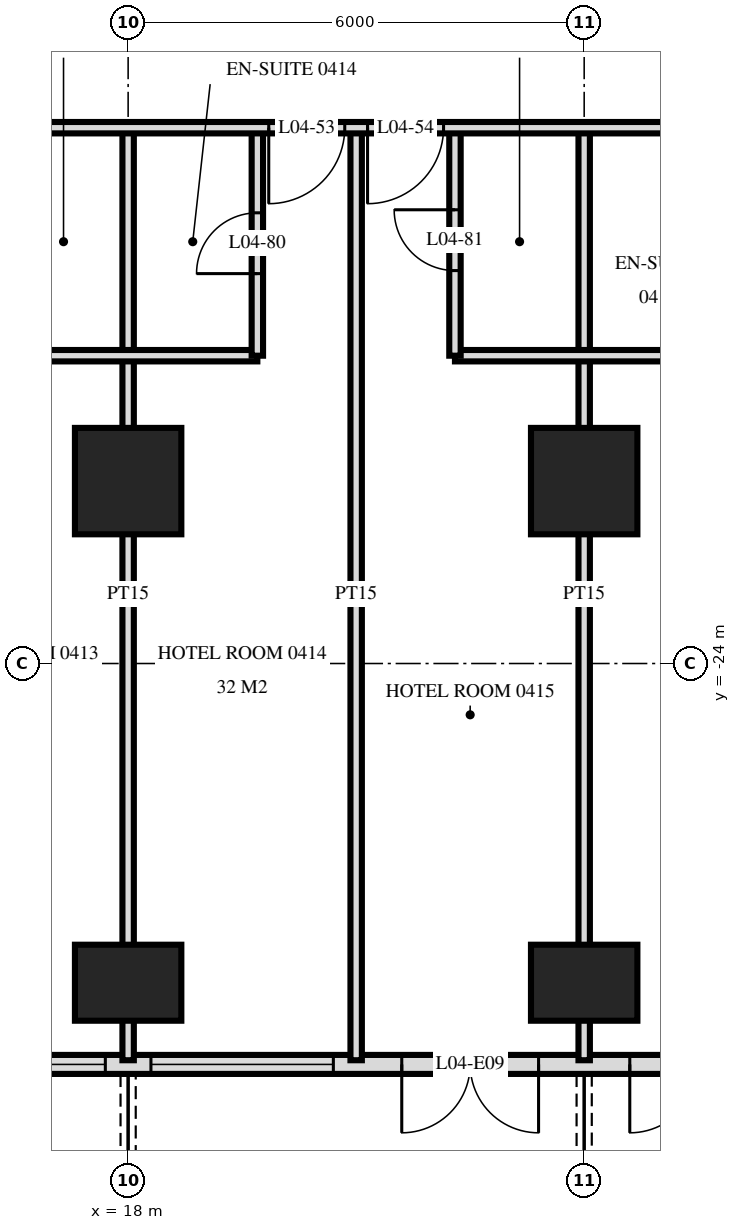
"""IFC4 building model, lengths in metres.
Left out: names, types, materials, properties, quantities, classifications, styles, units other than length and angle.
Written with IfcOpenShell. Run it as: python <this file> out.ifc"""

import sys

from ifc_helpers import new_model, si_unit, direction, frame, frame_2d, origin, origin_2d, place, context, subcontext, project, spatial, rectangle, extrude, element, fill, save


model = new_model("IFC4")
c1 = context("Model", 3, precision=1e-05, world=origin(), true_north=direction((0.0, 1.0)))
c2 = subcontext(c1, "Body", "Model", "MODEL_VIEW")
j1 = project(units=[si_unit("LENGTHUNIT", "METRE"), si_unit("PLANEANGLEUNIT", "RADIAN")], contexts=[c1])
p1 = place(None, origin())
s1 = spatial("IfcSite", under=j1, at=p1, CompositionType="ELEMENT")
p2 = place(p1, origin())
s2 = spatial("IfcBuilding", under=s1, at=p2, CompositionType="ELEMENT")
p3 = place(p2, frame((0.0, 0.0, 24.0)))
s3 = spatial("IfcBuildingStorey", under=s2, at=p3, CompositionType="ELEMENT", Elevation=24.0)
p4 = place(p3, frame((18.0, -28.2, -0.28), z_axis=(0.0, 0.0, 1.0), x_axis=(1.0, 0.0, 0.0)))
e1 = element("IfcColumn", 1, at=p4, inside=s3, PredefinedType="COLUMN", context=c2, shape_type="SweptSolid", body=[
    extrude(rectangle(XDim=1.4, YDim=1.0, at=origin_2d()), origin(), (0.0, 0.0, 1.0), 3.88),
])
p5 = place(p3, frame((18.0, -21.6, -0.28), z_axis=(0.0, 0.0, 1.0), x_axis=(1.0, 0.0, 0.0)))
e2 = element("IfcColumn", 2, at=p5, inside=s3, PredefinedType="COLUMN", context=c2, shape_type="SweptSolid", body=[
    extrude(rectangle(XDim=1.4, YDim=1.4, at=origin_2d()), origin(), (0.0, 0.0, 1.0), 3.88),
])
p6 = place(p3, frame((24.0, -28.2, -0.28), z_axis=(0.0, 0.0, 1.0), x_axis=(1.0, 0.0, 0.0)))
e3 = element("IfcColumn", 3, at=p6, inside=s3, PredefinedType="COLUMN", context=c2, shape_type="SweptSolid", body=[
    extrude(rectangle(XDim=1.4, YDim=1.0, at=origin_2d()), origin(), (0.0, 0.0, 1.0), 3.88),
])
p7 = place(p3, frame((24.0, -21.6, -0.28), z_axis=(0.0, 0.0, 1.0), x_axis=(1.0, 0.0, 0.0)))
e4 = element("IfcColumn", 4, at=p7, inside=s3, PredefinedType="COLUMN", context=c2, shape_type="SweptSolid", body=[
    extrude(rectangle(XDim=1.4, YDim=1.4, at=origin_2d()), origin(), (0.0, 0.0, 1.0), 3.88),
])
p8 = place(p3, frame((-28.775, -29.275, 0.0), z_axis=(0.0, 0.0, 1.0), x_axis=(1.0, 0.0, 0.0)))
e5 = element("IfcWall", 5, at=p8, inside=s3, PredefinedType="SOLIDWALL", context=c2, shape_type="SweptSolid", body=[
    extrude(rectangle(XDim=57.551, YDim=0.25, at=frame_2d((28.775, 0.0))), origin(), (0.0, 0.0, 1.0), 3.32),
])
p9 = place(p8, frame((0.575, 0.0, 0.0)))
e6 = element("IfcOpeningElement", 6, at=p9, cuts=e5, PredefinedType="OPENING", context=c2, shape_type="SweptSolid", body=[
    extrude(rectangle(XDim=1.8, YDim=2.4, at=frame_2d((0.9, 1.2))), frame((0.0, 0.135, 0.0), z_axis=(0.0, -1.0, 0.0), x_axis=(1.0, 0.0, 0.0)), (0.0, 0.0, 1.0), 0.27),
])
p10 = place(p8, frame((5.375, 0.0, 0.0)))
e7 = element("IfcOpeningElement", 7, at=p10, cuts=e5, PredefinedType="OPENING", context=c2, shape_type="SweptSolid", body=[
    extrude(rectangle(XDim=1.8, YDim=2.4, at=frame_2d((0.9, 1.2))), frame((0.0, 0.135, 0.0), z_axis=(0.0, -1.0, 0.0), x_axis=(1.0, 0.0, 0.0)), (0.0, 0.0, 1.0), 0.27),
])
p11 = place(p8, frame((8.075, 0.0, 0.3)))
e8 = element("IfcOpeningElement", 8, at=p11, cuts=e5, PredefinedType="OPENING", context=c2, shape_type="SweptSolid", body=[
    extrude(rectangle(XDim=2.4, YDim=2.1, at=frame_2d((1.2, 1.05))), frame((0.0, 0.135, 0.0), z_axis=(0.0, -1.0, 0.0), x_axis=(1.0, 0.0, 0.0)), (0.0, 0.0, 1.0), 0.27),
])
p12 = place(p8, frame((11.375, 0.0, 0.0)))
e9 = element("IfcOpeningElement", 9, at=p12, cuts=e5, PredefinedType="OPENING", context=c2, shape_type="SweptSolid", body=[
    extrude(rectangle(XDim=1.8, YDim=2.4, at=frame_2d((0.9, 1.2))), frame((0.0, 0.135, 0.0), z_axis=(0.0, -1.0, 0.0), x_axis=(1.0, 0.0, 0.0)), (0.0, 0.0, 1.0), 0.27),
])
p13 = place(p8, frame((14.075, 0.0, 0.3)))
e10 = element("IfcOpeningElement", 10, at=p13, cuts=e5, PredefinedType="OPENING", context=c2, shape_type="SweptSolid", body=[
    extrude(rectangle(XDim=2.4, YDim=2.1, at=frame_2d((1.2, 1.05))), frame((0.0, 0.135, 0.0), z_axis=(0.0, -1.0, 0.0), x_axis=(1.0, 0.0, 0.0)), (0.0, 0.0, 1.0), 0.27),
])
p14 = place(p8, frame((17.375, 0.0, 0.0)))
e11 = element("IfcOpeningElement", 11, at=p14, cuts=e5, PredefinedType="OPENING", context=c2, shape_type="SweptSolid", body=[
    extrude(rectangle(XDim=1.8, YDim=2.4, at=frame_2d((0.9, 1.2))), frame((0.0, 0.135, 0.0), z_axis=(0.0, -1.0, 0.0), x_axis=(1.0, 0.0, 0.0)), (0.0, 0.0, 1.0), 0.27),
])
p15 = place(p8, frame((20.075, 0.0, 0.3)))
e12 = element("IfcOpeningElement", 12, at=p15, cuts=e5, PredefinedType="OPENING", context=c2, shape_type="SweptSolid", body=[
    extrude(rectangle(XDim=2.4, YDim=2.1, at=frame_2d((1.2, 1.05))), frame((0.0, 0.135, 0.0), z_axis=(0.0, -1.0, 0.0), x_axis=(1.0, 0.0, 0.0)), (0.0, 0.0, 1.0), 0.27),
])
p16 = place(p8, frame((23.075, 0.0, 0.3)))
e13 = element("IfcOpeningElement", 13, at=p16, cuts=e5, PredefinedType="OPENING", context=c2, shape_type="SweptSolid", body=[
    extrude(rectangle(XDim=2.4, YDim=2.1, at=frame_2d((1.2, 1.05))), frame((0.0, 0.135, 0.0), z_axis=(0.0, -1.0, 0.0), x_axis=(1.0, 0.0, 0.0)), (0.0, 0.0, 1.0), 0.27),
])
p17 = place(p8, frame((26.375, 0.0, 0.0)))
e14 = element("IfcOpeningElement", 14, at=p17, cuts=e5, PredefinedType="OPENING", context=c2, shape_type="SweptSolid", body=[
    extrude(rectangle(XDim=1.8, YDim=2.4, at=frame_2d((0.9, 1.2))), frame((0.0, 0.135, 0.0), z_axis=(0.0, -1.0, 0.0), x_axis=(1.0, 0.0, 0.0)), (0.0, 0.0, 1.0), 0.27),
])
p18 = place(p8, frame((29.375, 0.0, 0.0)))
e15 = element("IfcOpeningElement", 15, at=p18, cuts=e5, PredefinedType="OPENING", context=c2, shape_type="SweptSolid", body=[
    extrude(rectangle(XDim=1.8, YDim=2.4, at=frame_2d((0.9, 1.2))), frame((0.0, 0.135, 0.0), z_axis=(0.0, -1.0, 0.0), x_axis=(1.0, 0.0, 0.0)), (0.0, 0.0, 1.0), 0.27),
])
p19 = place(p8, frame((32.075, 0.0, 0.3)))
e16 = element("IfcOpeningElement", 16, at=p19, cuts=e5, PredefinedType="OPENING", context=c2, shape_type="SweptSolid", body=[
    extrude(rectangle(XDim=2.4, YDim=2.1, at=frame_2d((1.2, 1.05))), frame((0.0, 0.135, 0.0), z_axis=(0.0, -1.0, 0.0), x_axis=(1.0, 0.0, 0.0)), (0.0, 0.0, 1.0), 0.27),
])
p20 = place(p8, frame((35.375, 0.0, 0.0)))
e17 = element("IfcOpeningElement", 17, at=p20, cuts=e5, PredefinedType="OPENING", context=c2, shape_type="SweptSolid", body=[
    extrude(rectangle(XDim=1.8, YDim=2.4, at=frame_2d((0.9, 1.2))), frame((0.0, 0.135, 0.0), z_axis=(0.0, -1.0, 0.0), x_axis=(1.0, 0.0, 0.0)), (0.0, 0.0, 1.0), 0.27),
])
p21 = place(p8, frame((38.075, 0.0, 0.3)))
e18 = element("IfcOpeningElement", 18, at=p21, cuts=e5, PredefinedType="OPENING", context=c2, shape_type="SweptSolid", body=[
    extrude(rectangle(XDim=2.4, YDim=2.1, at=frame_2d((1.2, 1.05))), frame((0.0, 0.135, 0.0), z_axis=(0.0, -1.0, 0.0), x_axis=(1.0, 0.0, 0.0)), (0.0, 0.0, 1.0), 0.27),
])
p22 = place(p8, frame((41.375, 0.0, 0.0)))
e19 = element("IfcOpeningElement", 19, at=p22, cuts=e5, PredefinedType="OPENING", context=c2, shape_type="SweptSolid", body=[
    extrude(rectangle(XDim=1.8, YDim=2.4, at=frame_2d((0.9, 1.2))), frame((0.0, 0.135, 0.0), z_axis=(0.0, -1.0, 0.0), x_axis=(1.0, 0.0, 0.0)), (0.0, 0.0, 1.0), 0.27),
])
p23 = place(p8, frame((44.075, 0.0, 0.3)))
e20 = element("IfcOpeningElement", 20, at=p23, cuts=e5, PredefinedType="OPENING", context=c2, shape_type="SweptSolid", body=[
    extrude(rectangle(XDim=2.4, YDim=2.1, at=frame_2d((1.2, 1.05))), frame((0.0, 0.135, 0.0), z_axis=(0.0, -1.0, 0.0), x_axis=(1.0, 0.0, 0.0)), (0.0, 0.0, 1.0), 0.27),
])
p24 = place(p8, frame((47.075, 0.0, 0.3)))
e21 = element("IfcOpeningElement", 21, at=p24, cuts=e5, PredefinedType="OPENING", context=c2, shape_type="SweptSolid", body=[
    extrude(rectangle(XDim=2.4, YDim=2.1, at=frame_2d((1.2, 1.05))), frame((0.0, 0.135, 0.0), z_axis=(0.0, -1.0, 0.0), x_axis=(1.0, 0.0, 0.0)), (0.0, 0.0, 1.0), 0.27),
])
p25 = place(p8, frame((50.375, 0.0, 0.0)))
e22 = element("IfcOpeningElement", 22, at=p25, cuts=e5, PredefinedType="OPENING", context=c2, shape_type="SweptSolid", body=[
    extrude(rectangle(XDim=1.8, YDim=2.4, at=frame_2d((0.9, 1.2))), frame((0.0, 0.135, 0.0), z_axis=(0.0, -1.0, 0.0), x_axis=(1.0, 0.0, 0.0)), (0.0, 0.0, 1.0), 0.27),
])
p26 = place(p8, frame((53.375, 0.0, 0.0)))
e23 = element("IfcOpeningElement", 23, at=p26, cuts=e5, PredefinedType="OPENING", context=c2, shape_type="SweptSolid", body=[
    extrude(rectangle(XDim=1.8, YDim=2.4, at=frame_2d((0.9, 1.2))), frame((0.0, 0.135, 0.0), z_axis=(0.0, -1.0, 0.0), x_axis=(1.0, 0.0, 0.0)), (0.0, 0.0, 1.0), 0.27),
])
p27 = place(p3, frame((24.0, -29.22, 0.0), z_axis=(0.0, 0.0, 1.0), x_axis=(0.0, 1.0, 0.0)))
e24 = element("IfcWall", 24, at=p27, inside=s3, PredefinedType="PARTITIONING", context=c2, shape_type="SweptSolid", body=[
    extrude(rectangle(XDim=12.27, YDim=0.15, at=frame_2d((6.135, 0.0))), origin(), (0.0, 0.0, 1.0), 3.32),
])
p28 = place(p3, frame((22.3, -19.95, 0.0), z_axis=(0.0, 0.0, 1.0), x_axis=(0.0, 1.0, 0.0)))
e25 = element("IfcWall", 25, at=p28, inside=s3, PredefinedType="PARTITIONING", context=c2, shape_type="SweptSolid", body=[
    extrude(rectangle(XDim=3.0, YDim=0.15, at=frame_2d((1.5, 0.0))), origin(), (0.0, 0.0, 1.0), 3.32),
])
p29 = place(p28, frame((1.12, 0.0, 0.0)))
e26 = element("IfcOpeningElement", 26, at=p29, cuts=e25, PredefinedType="OPENING", context=c2, shape_type="SweptSolid", body=[
    extrude(rectangle(XDim=0.8, YDim=2.1, at=frame_2d((0.4, 1.05))), frame((0.0, 0.085, 0.0), z_axis=(0.0, -1.0, 0.0), x_axis=(1.0, 0.0, 0.0)), (0.0, 0.0, 1.0), 0.17),
])
p30 = place(p3, frame((21.0, -29.22, 0.0), z_axis=(0.0, 0.0, 1.0), x_axis=(0.0, 1.0, 0.0)))
e27 = element("IfcWall", 27, at=p30, inside=s3, PredefinedType="PARTITIONING", context=c2, shape_type="SweptSolid", body=[
    extrude(rectangle(XDim=12.27, YDim=0.15, at=frame_2d((6.135, 0.0))), origin(), (0.0, 0.0, 1.0), 3.32),
])
p31 = place(p3, frame((19.7, -19.95, 0.0), z_axis=(0.0, 0.0, 1.0), x_axis=(0.0, 1.0, 0.0)))
e28 = element("IfcWall", 28, at=p31, inside=s3, PredefinedType="PARTITIONING", context=c2, shape_type="SweptSolid", body=[
    extrude(rectangle(XDim=3.0, YDim=0.15, at=frame_2d((1.5, 0.0))), origin(), (0.0, 0.0, 1.0), 3.32),
])
p32 = place(p31, frame((1.08, 0.0, 0.0)))
e29 = element("IfcOpeningElement", 29, at=p32, cuts=e28, PredefinedType="OPENING", context=c2, shape_type="SweptSolid", body=[
    extrude(rectangle(XDim=0.8, YDim=2.1, at=frame_2d((0.4, 1.05))), frame((0.0, 0.085, 0.0), z_axis=(0.0, -1.0, 0.0), x_axis=(1.0, 0.0, 0.0)), (0.0, 0.0, 1.0), 0.17),
])
p33 = place(p3, frame((18.0, -29.22, 0.0), z_axis=(0.0, 0.0, 1.0), x_axis=(0.0, 1.0, 0.0)))
e30 = element("IfcWall", 30, at=p33, inside=s3, PredefinedType="PARTITIONING", context=c2, shape_type="SweptSolid", body=[
    extrude(rectangle(XDim=12.27, YDim=0.15, at=frame_2d((6.135, 0.0))), origin(), (0.0, 0.0, 1.0), 3.32),
])
p34 = place(p3, frame((16.3, -19.95, 0.0), z_axis=(0.0, 0.0, 1.0), x_axis=(1.0, 0.0, 0.0)))
e31 = element("IfcWall", 31, at=p34, inside=s3, PredefinedType="PARTITIONING", context=c2, shape_type="SweptSolid", body=[
    extrude(rectangle(XDim=3.4, YDim=0.15, at=frame_2d((1.7, 0.0))), origin(), (0.0, 0.0, 1.0), 3.32),
])
p35 = place(p3, frame((22.3, -19.95, 0.0), z_axis=(0.0, 0.0, 1.0), x_axis=(1.0, 0.0, 0.0)))
e32 = element("IfcWall", 32, at=p35, inside=s3, PredefinedType="PARTITIONING", context=c2, shape_type="SweptSolid", body=[
    extrude(rectangle(XDim=4.7, YDim=0.15, at=frame_2d((2.35, 0.0))), origin(), (0.0, 0.0, 1.0), 3.32),
])
p36 = place(p3, frame((-33.12, -16.95, 0.0), z_axis=(0.0, 0.0, 1.0), x_axis=(1.0, 0.0, 0.0)))
e33 = element("IfcWall", 33, at=p36, inside=s3, PredefinedType="PARTITIONING", context=c2, shape_type="SweptSolid", body=[
    extrude(rectangle(XDim=66.24, YDim=0.15, at=frame_2d((33.12, 0.0))), origin(), (0.0, 0.0, 1.0), 3.32),
])
p37 = place(p36, frame((9.27, 0.0, 0.0)))
e34 = element("IfcOpeningElement", 34, at=p37, cuts=e33, PredefinedType="OPENING", context=c2, shape_type="SweptSolid", body=[
    extrude(rectangle(XDim=1.0, YDim=2.1, at=frame_2d((0.5, 1.05))), frame((0.0, 0.085, 0.0), z_axis=(0.0, -1.0, 0.0), x_axis=(1.0, 0.0, 0.0)), (0.0, 0.0, 1.0), 0.17),
])
p38 = place(p36, frame((13.97, 0.0, 0.0)))
e35 = element("IfcOpeningElement", 35, at=p38, cuts=e33, PredefinedType="OPENING", context=c2, shape_type="SweptSolid", body=[
    extrude(rectangle(XDim=1.0, YDim=2.1, at=frame_2d((0.5, 1.05))), frame((0.0, 0.085, 0.0), z_axis=(0.0, -1.0, 0.0), x_axis=(1.0, 0.0, 0.0)), (0.0, 0.0, 1.0), 0.17),
])
p39 = place(p36, frame((15.27, 0.0, 0.0)))
e36 = element("IfcOpeningElement", 36, at=p39, cuts=e33, PredefinedType="OPENING", context=c2, shape_type="SweptSolid", body=[
    extrude(rectangle(XDim=1.0, YDim=2.1, at=frame_2d((0.5, 1.05))), frame((0.0, 0.085, 0.0), z_axis=(0.0, -1.0, 0.0), x_axis=(1.0, 0.0, 0.0)), (0.0, 0.0, 1.0), 0.17),
])
p40 = place(p36, frame((19.97, 0.0, 0.0)))
e37 = element("IfcOpeningElement", 37, at=p40, cuts=e33, PredefinedType="OPENING", context=c2, shape_type="SweptSolid", body=[
    extrude(rectangle(XDim=1.0, YDim=2.1, at=frame_2d((0.5, 1.05))), frame((0.0, 0.085, 0.0), z_axis=(0.0, -1.0, 0.0), x_axis=(1.0, 0.0, 0.0)), (0.0, 0.0, 1.0), 0.17),
])
p41 = place(p36, frame((22.27, 0.0, 0.0)))
e38 = element("IfcOpeningElement", 38, at=p41, cuts=e33, PredefinedType="OPENING", context=c2, shape_type="SweptSolid", body=[
    extrude(rectangle(XDim=1.0, YDim=2.1, at=frame_2d((0.5, 1.05))), frame((0.0, 0.085, 0.0), z_axis=(0.0, -1.0, 0.0), x_axis=(1.0, 0.0, 0.0)), (0.0, 0.0, 1.0), 0.17),
])
p42 = place(p36, frame((28.97, 0.0, 0.0)))
e39 = element("IfcOpeningElement", 39, at=p42, cuts=e33, PredefinedType="OPENING", context=c2, shape_type="SweptSolid", body=[
    extrude(rectangle(XDim=1.0, YDim=2.1, at=frame_2d((0.5, 1.05))), frame((0.0, 0.085, 0.0), z_axis=(0.0, -1.0, 0.0), x_axis=(1.0, 0.0, 0.0)), (0.0, 0.0, 1.0), 0.17),
])
p43 = place(p36, frame((30.27, 0.0, 0.0)))
e40 = element("IfcOpeningElement", 40, at=p43, cuts=e33, PredefinedType="OPENING", context=c2, shape_type="SweptSolid", body=[
    extrude(rectangle(XDim=1.0, YDim=2.1, at=frame_2d((0.5, 1.05))), frame((0.0, 0.085, 0.0), z_axis=(0.0, -1.0, 0.0), x_axis=(1.0, 0.0, 0.0)), (0.0, 0.0, 1.0), 0.17),
])
p44 = place(p36, frame((34.97, 0.0, 0.0)))
e41 = element("IfcOpeningElement", 41, at=p44, cuts=e33, PredefinedType="OPENING", context=c2, shape_type="SweptSolid", body=[
    extrude(rectangle(XDim=1.0, YDim=2.1, at=frame_2d((0.5, 1.05))), frame((0.0, 0.085, 0.0), z_axis=(0.0, -1.0, 0.0), x_axis=(1.0, 0.0, 0.0)), (0.0, 0.0, 1.0), 0.17),
])
p45 = place(p36, frame((36.27, 0.0, 0.0)))
e42 = element("IfcOpeningElement", 42, at=p45, cuts=e33, PredefinedType="OPENING", context=c2, shape_type="SweptSolid", body=[
    extrude(rectangle(XDim=1.0, YDim=2.1, at=frame_2d((0.5, 1.05))), frame((0.0, 0.085, 0.0), z_axis=(0.0, -1.0, 0.0), x_axis=(1.0, 0.0, 0.0)), (0.0, 0.0, 1.0), 0.17),
])
p46 = place(p36, frame((40.97, 0.0, 0.0)))
e43 = element("IfcOpeningElement", 43, at=p46, cuts=e33, PredefinedType="OPENING", context=c2, shape_type="SweptSolid", body=[
    extrude(rectangle(XDim=1.0, YDim=2.1, at=frame_2d((0.5, 1.05))), frame((0.0, 0.085, 0.0), z_axis=(0.0, -1.0, 0.0), x_axis=(1.0, 0.0, 0.0)), (0.0, 0.0, 1.0), 0.17),
])
p47 = place(p36, frame((42.27, 0.0, 0.0)))
e44 = element("IfcOpeningElement", 44, at=p47, cuts=e33, PredefinedType="OPENING", context=c2, shape_type="SweptSolid", body=[
    extrude(rectangle(XDim=1.0, YDim=2.1, at=frame_2d((0.5, 1.05))), frame((0.0, 0.085, 0.0), z_axis=(0.0, -1.0, 0.0), x_axis=(1.0, 0.0, 0.0)), (0.0, 0.0, 1.0), 0.17),
])
p48 = place(p36, frame((46.97, 0.0, 0.0)))
e45 = element("IfcOpeningElement", 45, at=p48, cuts=e33, PredefinedType="OPENING", context=c2, shape_type="SweptSolid", body=[
    extrude(rectangle(XDim=1.0, YDim=2.1, at=frame_2d((0.5, 1.05))), frame((0.0, 0.085, 0.0), z_axis=(0.0, -1.0, 0.0), x_axis=(1.0, 0.0, 0.0)), (0.0, 0.0, 1.0), 0.17),
])
p49 = place(p36, frame((48.27, 0.0, 0.0)))
e46 = element("IfcOpeningElement", 46, at=p49, cuts=e33, PredefinedType="OPENING", context=c2, shape_type="SweptSolid", body=[
    extrude(rectangle(XDim=1.0, YDim=2.1, at=frame_2d((0.5, 1.05))), frame((0.0, 0.085, 0.0), z_axis=(0.0, -1.0, 0.0), x_axis=(1.0, 0.0, 0.0)), (0.0, 0.0, 1.0), 0.17),
])
p50 = place(p36, frame((52.97, 0.0, 0.0)))
e47 = element("IfcOpeningElement", 47, at=p50, cuts=e33, PredefinedType="OPENING", context=c2, shape_type="SweptSolid", body=[
    extrude(rectangle(XDim=1.0, YDim=2.1, at=frame_2d((0.5, 1.05))), frame((0.0, 0.085, 0.0), z_axis=(0.0, -1.0, 0.0), x_axis=(1.0, 0.0, 0.0)), (0.0, 0.0, 1.0), 0.17),
])
p51 = place(p36, frame((54.27, 0.0, 0.0)))
e48 = element("IfcOpeningElement", 48, at=p51, cuts=e33, PredefinedType="OPENING", context=c2, shape_type="SweptSolid", body=[
    extrude(rectangle(XDim=1.0, YDim=2.1, at=frame_2d((0.5, 1.05))), frame((0.0, 0.085, 0.0), z_axis=(0.0, -1.0, 0.0), x_axis=(1.0, 0.0, 0.0)), (0.0, 0.0, 1.0), 0.17),
])
p52 = place(p36, frame((4.4, 0.0, 0.0)))
e49 = element("IfcOpeningElement", 49, at=p52, cuts=e33, PredefinedType="OPENING", context=c2, shape_type="SweptSolid", body=[
    extrude(rectangle(XDim=1.0, YDim=2.1, at=frame_2d((0.5, 1.05))), frame((0.0, 0.085, 0.0), z_axis=(0.0, -1.0, 0.0), x_axis=(1.0, 0.0, 0.0)), (0.0, 0.0, 1.0), 0.17),
])
p53 = place(p36, frame((60.8, 0.0, 0.0)))
e50 = element("IfcOpeningElement", 50, at=p53, cuts=e33, PredefinedType="OPENING", context=c2, shape_type="SweptSolid", body=[
    extrude(rectangle(XDim=1.0, YDim=2.1, at=frame_2d((0.5, 1.05))), frame((0.0, 0.085, 0.0), z_axis=(0.0, -1.0, 0.0), x_axis=(1.0, 0.0, 0.0)), (0.0, 0.0, 1.0), 0.17),
])
p54 = place(p23, origin())
e51 = element("IfcWindow", 51, at=p54, inside=s3, PartitioningType="SINGLE_PANEL", PredefinedType="WINDOW", context=c2, shape_type="SweptSolid", body=[
    extrude(rectangle(XDim=2.4, YDim=2.1, at=frame_2d((1.2, 1.05))), frame((0.0, 0.03, 0.0), z_axis=(0.0, -1.0, 0.0), x_axis=(1.0, 0.0, 0.0)), (0.0, 0.0, 1.0), 0.06),
])
fill(e20, e51)
p55 = place(p24, origin())
e52 = element("IfcWindow", 52, at=p55, inside=s3, PartitioningType="SINGLE_PANEL", PredefinedType="WINDOW", context=c2, shape_type="SweptSolid", body=[
    extrude(rectangle(XDim=2.4, YDim=2.1, at=frame_2d((1.2, 1.05))), frame((0.0, 0.03, 0.0), z_axis=(0.0, -1.0, 0.0), x_axis=(1.0, 0.0, 0.0)), (0.0, 0.0, 1.0), 0.06),
])
fill(e21, e52)
p56 = place(p25, frame((0.9, 0.0, 0.0), z_axis=(0.0, 0.0, 1.0), x_axis=(-1.0, 0.0, 0.0)))
e53 = element("IfcDoor", 53, at=p56, inside=s3, OperationType="DOUBLE_DOOR_SINGLE_SWING", PredefinedType="DOOR", context=c2, shape_type="SweptSolid", body=[
    extrude(rectangle(XDim=1.8, YDim=2.4, at=frame_2d((0.0, 1.2))), frame((0.0, -0.025, 0.0), z_axis=(0.0, 1.0, 0.0), x_axis=(-1.0, 0.0, 0.0)), (0.0, 0.0, 1.0), 0.05),
])
fill(e22, e53)
p57 = place(p26, frame((0.9, 0.0, 0.0), z_axis=(0.0, 0.0, 1.0), x_axis=(-1.0, 0.0, 0.0)))
e54 = element("IfcDoor", 54, at=p57, inside=s3, OperationType="DOUBLE_DOOR_SINGLE_SWING", PredefinedType="DOOR", context=c2, shape_type="SweptSolid", body=[
    extrude(rectangle(XDim=1.8, YDim=2.4, at=frame_2d((0.0, 1.2))), frame((0.0, -0.025, 0.0), z_axis=(0.0, 1.0, 0.0), x_axis=(-1.0, 0.0, 0.0)), (0.0, 0.0, 1.0), 0.05),
])
fill(e23, e54)
p58 = place(p50, frame((0.5, 0.0, 0.0), z_axis=(0.0, 0.0, 1.0), x_axis=(-1.0, 0.0, 0.0)))
e55 = element("IfcDoor", 55, at=p58, inside=s3, OperationType="SINGLE_SWING_LEFT", PredefinedType="DOOR", context=c2, shape_type="SweptSolid", body=[
    extrude(rectangle(XDim=1.0, YDim=2.1, at=frame_2d((0.0, 1.05))), frame((0.0, -0.025, 0.0), z_axis=(0.0, 1.0, 0.0), x_axis=(-1.0, 0.0, 0.0)), (0.0, 0.0, 1.0), 0.05),
])
fill(e47, e55)
p59 = place(p51, frame((0.5, 0.0, 0.0), z_axis=(0.0, 0.0, 1.0), x_axis=(-1.0, 0.0, 0.0)))
e56 = element("IfcDoor", 56, at=p59, inside=s3, OperationType="SINGLE_SWING_LEFT", PredefinedType="DOOR", context=c2, shape_type="SweptSolid", body=[
    extrude(rectangle(XDim=1.0, YDim=2.1, at=frame_2d((0.0, 1.05))), frame((0.0, -0.025, 0.0), z_axis=(0.0, 1.0, 0.0), x_axis=(-1.0, 0.0, 0.0)), (0.0, 0.0, 1.0), 0.05),
])
fill(e48, e56)
p60 = place(p32, origin())
e57 = element("IfcDoor", 57, at=p60, inside=s3, OperationType="SINGLE_SWING_RIGHT", PredefinedType="DOOR", context=c2, shape_type="SweptSolid", body=[
    extrude(rectangle(XDim=0.8, YDim=2.1, at=frame_2d((0.4, 1.05))), frame((0.0, 0.025, 0.0), z_axis=(0.0, -1.0, 0.0), x_axis=(1.0, 0.0, 0.0)), (0.0, 0.0, 1.0), 0.05),
])
fill(e29, e57)
p61 = place(p29, origin())
e58 = element("IfcDoor", 58, at=p61, inside=s3, OperationType="SINGLE_SWING_LEFT", PredefinedType="DOOR", context=c2, shape_type="SweptSolid", body=[
    extrude(rectangle(XDim=0.8, YDim=2.1, at=frame_2d((0.4, 1.05))), frame((0.0, 0.025, 0.0), z_axis=(0.0, -1.0, 0.0), x_axis=(1.0, 0.0, 0.0)), (0.0, 0.0, 1.0), 0.05),
])
fill(e26, e58)
save(model, sys.argv[1])
